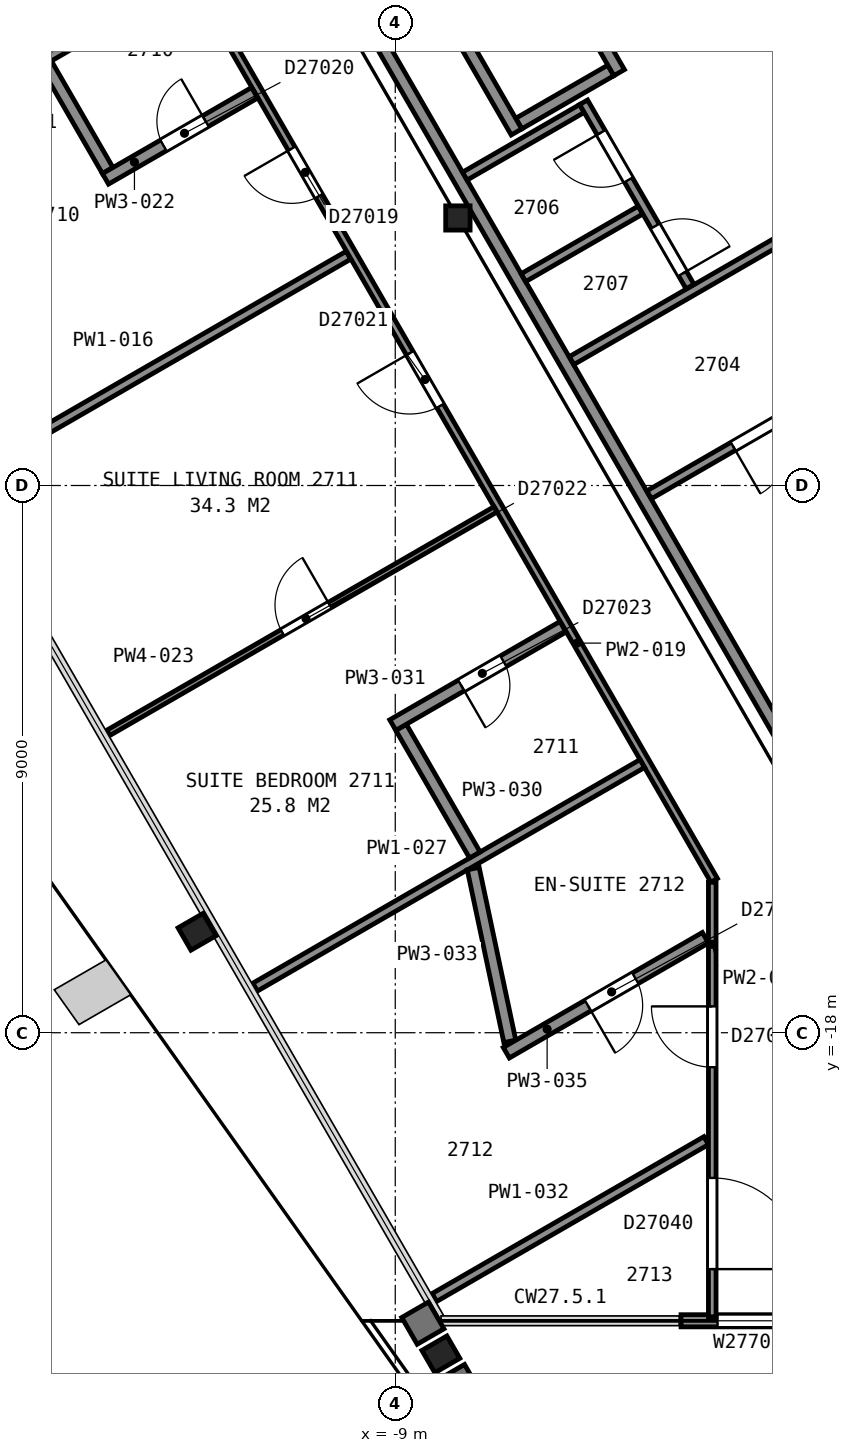
"""IFC4 building model, lengths in metres.
Left out: names, types, materials, properties, quantities, classifications, styles, units other than length and angle.
Written with IfcOpenShell. Run it as: python <this file> out.ifc"""

import sys

from ifc_helpers import new_model, si_unit, direction, frame, frame_2d, origin, origin_2d, place, context, subcontext, project, spatial, rectangle, i_section, extrude, element, fill, save


model = new_model("IFC4")
c1 = context("Model", 3, precision=1e-05, world=origin(), true_north=direction((0.0, 1.0)))
c2 = subcontext(c1, "Body", "Model", "MODEL_VIEW")
j1 = project(units=[si_unit("LENGTHUNIT", "METRE"), si_unit("PLANEANGLEUNIT", "RADIAN")], contexts=[c1])
p1 = place(None, origin())
s1 = spatial("IfcSite", under=j1, at=p1, CompositionType="ELEMENT")
p2 = place(p1, origin())
s2 = spatial("IfcBuilding", under=s1, at=p2, CompositionType="ELEMENT")
p3 = place(p2, frame((0.0, 0.0, 114.4)))
s3 = spatial("IfcBuildingStorey", under=s2, at=p3, CompositionType="ELEMENT", Elevation=114.4)
p4 = place(p3, frame((-12.26, -16.34, 0.0), z_axis=(0.0, 0.0, 1.0), x_axis=(-0.5, 0.866025403784, 0.0)))
e1 = element("IfcColumn", 1, at=p4, inside=s3, PredefinedType="COLUMN", context=c2, shape_type="SweptSolid", body=[
    extrude(i_section(OverallWidth=0.424, OverallDepth=0.475, WebThickness=0.048, FlangeThickness=0.077, FilletRadius=0.015, at=origin_2d()), origin(), (0.0, 0.0, 1.0), 3.56),
])
p5 = place(p3, frame((-8.25, -23.29, 0.0), z_axis=(0.0, 0.0, 1.0), x_axis=(-0.5, 0.866025403784, 0.0)))
e2 = element("IfcColumn", 2, at=p5, inside=s3, PredefinedType="COLUMN", context=c2, shape_type="SweptSolid", body=[
    extrude(i_section(OverallWidth=0.424, OverallDepth=0.475, WebThickness=0.048, FlangeThickness=0.077, FilletRadius=0.015, at=origin_2d()), origin(), (0.0, 0.0, 1.0), 3.555),
])
p6 = place(p3, frame((-7.97, -4.6, 0.0), z_axis=(0.0, 0.0, 1.0), x_axis=(1.0, 0.0, 0.0)))
e3 = element("IfcColumn", 3, at=p6, inside=s3, PredefinedType="COLUMN", context=c2, shape_type="SweptSolid", body=[
    extrude(i_section(OverallWidth=0.401, OverallDepth=0.399, WebThickness=0.025, FlangeThickness=0.04, FilletRadius=0.015, at=origin_2d()), origin(), (0.0, 0.0, 1.0), 3.6),
])
p7 = place(p3, frame((-4.3, -22.738, 0.0), z_axis=(0.0, 0.0, 1.0), x_axis=(1.0, 0.0, 0.0)))
e4 = element("IfcWall", 4, at=p7, inside=s3, PredefinedType="SOLIDWALL", context=c2, shape_type="SweptSolid", body=[
    extrude(rectangle(XDim=8.6, YDim=0.2, at=frame_2d((4.3, 0.0))), origin(), (0.0, 0.0, 1.0), 2.613),
])
p8 = place(p7, frame((0.6, 0.0, 0.9)))
e5 = element("IfcOpeningElement", 5, at=p8, cuts=e4, PredefinedType="OPENING", context=c2, shape_type="SweptSolid", body=[
    extrude(rectangle(XDim=1.0, YDim=1.5, at=frame_2d((0.5, 0.75))), frame((0.0, 0.11, 0.0), z_axis=(0.0, -1.0, 0.0), x_axis=(1.0, 0.0, 0.0)), (0.0, 0.0, 1.0), 0.22),
])
p9 = place(p7, frame((2.2, 0.0, 0.0)))
e6 = element("IfcOpeningElement", 6, at=p9, cuts=e4, PredefinedType="OPENING", context=c2, shape_type="SweptSolid", body=[
    extrude(rectangle(XDim=1.8, YDim=2.4, at=frame_2d((0.9, 1.2))), frame((0.0, 0.11, 0.0), z_axis=(0.0, -1.0, 0.0), x_axis=(1.0, 0.0, 0.0)), (0.0, 0.0, 1.0), 0.22),
])
p10 = place(p7, frame((4.6, 0.0, 0.0)))
e7 = element("IfcOpeningElement", 7, at=p10, cuts=e4, PredefinedType="OPENING", context=c2, shape_type="SweptSolid", body=[
    extrude(rectangle(XDim=1.8, YDim=2.4, at=frame_2d((0.9, 1.2))), frame((0.0, 0.11, 0.0), z_axis=(0.0, -1.0, 0.0), x_axis=(1.0, 0.0, 0.0)), (0.0, 0.0, 1.0), 0.22),
])
p11 = place(p7, frame((7.0, 0.0, 0.9)))
e8 = element("IfcOpeningElement", 8, at=p11, cuts=e4, PredefinedType="OPENING", context=c2, shape_type="SweptSolid", body=[
    extrude(rectangle(XDim=1.0, YDim=1.5, at=frame_2d((0.5, 0.75))), frame((0.0, 0.11, 0.0), z_axis=(0.0, -1.0, 0.0), x_axis=(1.0, 0.0, 0.0)), (0.0, 0.0, 1.0), 0.22),
])
p12 = place(p3, frame((-6.97, -3.048, 0.0), z_axis=(0.0, 0.0, 1.0), x_axis=(0.866036909293, 0.499980071345, 0.0)))
e9 = element("IfcWall", 9, at=p12, inside=s3, PredefinedType="PARTITIONING", context=c2, shape_type="SweptSolid", body=[
    extrude(rectangle(XDim=1.75, YDim=0.2, at=frame_2d((0.875, 0.0))), origin(), (0.0, 0.0, 1.0), 3.6),
])
p13 = place(p3, frame((-5.318, -2.21, 0.0), z_axis=(0.0, 0.0, 1.0), x_axis=(-0.499938297808, 0.866061024631, 0.0)))
e10 = element("IfcWall", 10, at=p13, inside=s3, PredefinedType="PARTITIONING", context=c2, shape_type="SweptSolid", body=[
    extrude(rectangle(XDim=2.35, YDim=0.2, at=frame_2d((1.175, 0.0))), origin(), (0.0, 0.0, 1.0), 3.6),
])
p14 = place(p3, frame((-7.006, -3.185, 0.0), z_axis=(0.0, 0.0, 1.0), x_axis=(-0.499990435942, 0.866030925526, 0.0)))
e11 = element("IfcWall", 11, at=p14, inside=s3, PredefinedType="PARTITIONING", context=c2, shape_type="SweptSolid", body=[
    extrude(rectangle(XDim=2.55, YDim=0.2, at=frame_2d((1.275, 0.0))), origin(), (0.0, 0.0, 1.0), 3.6),
])
p15 = place(p3, frame((-13.664, 5.946, 0.0), z_axis=(0.0, 0.0, 1.0), x_axis=(0.499994327219, -0.866028678941, 0.0)))
e12 = element("IfcWall", 12, at=p15, inside=s3, PredefinedType="PARTITIONING", context=c2, shape_type="SweptSolid", body=[
    extrude(rectangle(XDim=23.968, YDim=0.2, at=frame_2d((11.984, 0.0))), origin(), (0.0, 0.0, 1.0), 3.35),
])
p16 = place(p3, frame((-7.856, -3.912, 0.0), z_axis=(0.0, 0.0, 1.0), x_axis=(0.865971748, 0.500092923031, 0.0)))
e13 = element("IfcWall", 13, at=p16, inside=s3, PredefinedType="PARTITIONING", context=c2, shape_type="SweptSolid", body=[
    extrude(rectangle(XDim=2.225, YDim=0.15, at=frame_2d((1.112, 0.0))), origin(), (0.0, 0.0, 1.0), 3.35),
])
p17 = place(p3, frame((-6.892, -5.582, 0.0), z_axis=(0.0, 0.0, 1.0), x_axis=(0.865944298464, 0.500140452231, 0.0)))
e14 = element("IfcWall", 14, at=p17, inside=s3, PredefinedType="PARTITIONING", context=c2, shape_type="SweptSolid", body=[
    extrude(rectangle(XDim=2.224, YDim=0.15, at=frame_2d((1.112, 0.0))), origin(), (0.0, 0.0, 1.0), 3.35),
])
p18 = place(p3, frame((-6.1, -6.946, 0.0), z_axis=(0.0, 0.0, 1.0), x_axis=(0.866038200431, 0.499977834903, 0.0)))
e15 = element("IfcWall", 15, at=p18, inside=s3, PredefinedType="PARTITIONING", context=c2, shape_type="SweptSolid", body=[
    extrude(rectangle(XDim=4.22, YDim=0.15, at=frame_2d((2.11, 0.0))), origin(), (0.0, 0.0, 1.0), 3.35),
])
p19 = place(p3, frame((-4.152, -5.729, 0.0), z_axis=(0.0, 0.0, 1.0), x_axis=(-0.500024287448, 0.866011380966, 0.0)))
e16 = element("IfcWall", 16, at=p19, inside=s3, PredefinedType="PARTITIONING", context=c2, shape_type="SweptSolid", body=[
    extrude(rectangle(XDim=3.501, YDim=0.15, at=frame_2d((1.75, 0.0))), origin(), (0.0, 0.0, 1.0), 3.35),
])
p20 = place(p19, frame((2.026, 0.0, 0.0)))
e17 = element("IfcOpeningElement", 17, at=p20, cuts=e16, PredefinedType="OPENING", context=c2, shape_type="SweptSolid", body=[
    extrude(rectangle(XDim=0.9, YDim=2.1, at=frame_2d((0.45, 1.05))), frame((0.0, 0.085, 0.0), z_axis=(0.0, -1.0, 0.0), x_axis=(1.0, 0.0, 0.0)), (0.0, 0.0, 1.0), 0.17),
])
p21 = place(p19, frame((0.248, 0.0, 0.0)))
e18 = element("IfcOpeningElement", 18, at=p21, cuts=e16, PredefinedType="OPENING", context=c2, shape_type="SweptSolid", body=[
    extrude(rectangle(XDim=0.9, YDim=2.1, at=frame_2d((0.45, 1.05))), frame((0.0, 0.085, 0.0), z_axis=(0.0, -1.0, 0.0), x_axis=(1.0, 0.0, 0.0)), (0.0, 0.0, 1.0), 0.17),
])
p22 = place(p3, frame((-4.825, -9.154, 0.0), z_axis=(0.0, 0.0, 1.0), x_axis=(0.866023738697, 0.500002884005, 0.0)))
e19 = element("IfcWall", 19, at=p22, inside=s3, PredefinedType="PARTITIONING", context=c2, shape_type="SweptSolid", body=[
    extrude(rectangle(XDim=4.22, YDim=0.15, at=frame_2d((2.11, 0.0))), origin(), (0.0, 0.0, 1.0), 3.35),
])
p23 = place(p22, frame((1.595, 0.0, 0.0)))
e20 = element("IfcOpeningElement", 20, at=p23, cuts=e19, PredefinedType="OPENING", context=c2, shape_type="SweptSolid", body=[
    extrude(rectangle(XDim=0.9, YDim=2.1, at=frame_2d((0.45, 1.05))), frame((0.0, 0.085, 0.0), z_axis=(0.0, -1.0, 0.0), x_axis=(1.0, 0.0, 0.0)), (0.0, 0.0, 1.0), 0.17),
])
p24 = place(p3, frame((-18.775, -4.31, 0.0), z_axis=(0.0, 0.0, 1.0), x_axis=(0.866003534372, 0.50003787702, 0.0)))
e21 = element("IfcWall", 21, at=p24, inside=s3, PredefinedType="PARTITIONING", context=c2, shape_type="SweptSolid", body=[
    extrude(rectangle(XDim=7.348, YDim=0.15, at=frame_2d((3.674, 0.0))), origin(), (0.0, 0.0, 1.0), 2.613),
])
p25 = place(p3, frame((-16.133, -8.887, 0.0), z_axis=(0.0, 0.0, 1.0), x_axis=(0.865997454095, 0.500048407157, 0.0)))
e22 = element("IfcWall", 22, at=p25, inside=s3, PredefinedType="PARTITIONING", context=c2, shape_type="SweptSolid", body=[
    extrude(rectangle(XDim=7.348, YDim=0.15, at=frame_2d((3.674, 0.0))), origin(), (0.0, 0.0, 1.0), 2.613),
])
p26 = place(p3, frame((-3.756, -15.494, 0.0), z_axis=(0.0, 0.0, 1.0), x_axis=(-0.500027787016, 0.866009360349, 0.0)))
e23 = element("IfcWall", 23, at=p26, inside=s3, PredefinedType="PARTITIONING", context=c2, shape_type="SweptSolid", body=[
    extrude(rectangle(XDim=23.856, YDim=0.125, at=frame_2d((11.928, 0.0))), origin(), (0.0, 0.0, 1.0), 2.613),
])
p27 = place(p26, frame((22.393, 0.0, 0.0)))
e24 = element("IfcOpeningElement", 24, at=p27, cuts=e23, PredefinedType="OPENING", context=c2, shape_type="SweptSolid", body=[
    extrude(rectangle(XDim=1.0, YDim=2.1, at=frame_2d((0.5, 1.05))), frame((0.0, 0.073, 0.0), z_axis=(0.0, -1.0, 0.0), x_axis=(1.0, 0.0, 0.0)), (0.0, 0.0, 1.0), 0.145),
])
p28 = place(p26, frame((12.996, 0.0, 0.0)))
e25 = element("IfcOpeningElement", 25, at=p28, cuts=e23, PredefinedType="OPENING", context=c2, shape_type="SweptSolid", body=[
    extrude(rectangle(XDim=0.9, YDim=2.1, at=frame_2d((0.45, 1.05))), frame((0.0, 0.073, 0.0), z_axis=(0.0, -1.0, 0.0), x_axis=(1.0, 0.0, 0.0)), (0.0, 0.0, 1.0), 0.145),
])
p29 = place(p26, frame((9.011, 0.0, 0.0)))
e26 = element("IfcOpeningElement", 26, at=p29, cuts=e23, PredefinedType="OPENING", context=c2, shape_type="SweptSolid", body=[
    extrude(rectangle(XDim=1.0, YDim=2.1, at=frame_2d((0.5, 1.05))), frame((0.0, 0.073, 0.0), z_axis=(0.0, -1.0, 0.0), x_axis=(1.0, 0.0, 0.0)), (0.0, 0.0, 1.0), 0.145),
])
p30 = place(p3, frame((-14.739, -2.071, 0.0), z_axis=(0.0, 0.0, 1.0), x_axis=(0.500078207394, -0.865980246016, 0.0)))
e27 = element("IfcWall", 27, at=p30, inside=s3, PredefinedType="PARTITIONING", context=c2, shape_type="SweptSolid", body=[
    extrude(rectangle(XDim=2.02, YDim=0.2, at=frame_2d((1.01, 0.0))), origin(), (0.0, 0.0, 1.0), 2.613),
])
p31 = place(p3, frame((-13.766, -3.957, 0.0), z_axis=(0.0, 0.0, 1.0), x_axis=(0.866033446572, 0.499986069224, 0.0)))
e28 = element("IfcWall", 28, at=p31, inside=s3, PredefinedType="PARTITIONING", context=c2, shape_type="SweptSolid", body=[
    extrude(rectangle(XDim=2.833, YDim=0.2, at=frame_2d((1.416, 0.0))), origin(), (0.0, 0.0, 1.0), 2.613),
])
p32 = place(p31, frame((1.1, 0.0, 0.0)))
e29 = element("IfcOpeningElement", 29, at=p32, cuts=e28, PredefinedType="OPENING", context=c2, shape_type="SweptSolid", body=[
    extrude(rectangle(XDim=0.8, YDim=2.1, at=frame_2d((0.4, 1.05))), frame((0.0, 0.11, 0.0), z_axis=(0.0, -1.0, 0.0), x_axis=(1.0, 0.0, 0.0)), (0.0, 0.0, 1.0), 0.22),
])
p33 = place(p3, frame((-7.351, -9.392, 0.0), z_axis=(0.0, 0.0, 1.0), x_axis=(-0.8660606245, -0.499938990969, 0.0)))
e30 = element("IfcWall", 30, at=p33, inside=s3, PredefinedType="PARTITIONING", context=c2, shape_type="SweptSolid", body=[
    extrude(rectangle(XDim=7.353, YDim=0.1, at=frame_2d((3.676, 0.0))), origin(), (0.0, 0.0, 1.0), 2.613),
])
p34 = place(p33, frame((3.148, 0.0, 0.0)))
e31 = element("IfcOpeningElement", 31, at=p34, cuts=e30, PredefinedType="OPENING", context=c2, shape_type="SweptSolid", body=[
    extrude(rectangle(XDim=0.9, YDim=2.1, at=frame_2d((0.45, 1.05))), frame((0.0, 0.06, 0.0), z_axis=(0.0, -1.0, 0.0), x_axis=(1.0, 0.0, 0.0)), (0.0, 0.0, 1.0), 0.12),
])
p35 = place(p3, frame((-11.304, -17.25, 0.0), z_axis=(0.0, 0.0, 1.0), x_axis=(0.86600919026, 0.500028081597, 0.0)))
e32 = element("IfcWall", 32, at=p35, inside=s3, PredefinedType="PARTITIONING", context=c2, shape_type="SweptSolid", body=[
    extrude(rectangle(XDim=7.353, YDim=0.15, at=frame_2d((3.676, 0.0))), origin(), (0.0, 0.0, 1.0), 2.613),
])
p36 = place(p3, frame((-8.904, -12.977, 0.0), z_axis=(0.0, 0.0, 1.0), x_axis=(0.499960613912, -0.866048142159, 0.0)))
e33 = element("IfcWall", 33, at=p36, inside=s3, PredefinedType="PARTITIONING", context=c2, shape_type="SweptSolid", body=[
    extrude(rectangle(XDim=2.426, YDim=0.2, at=frame_2d((1.213, 0.0))), origin(), (0.0, 0.0, 1.0), 2.613),
])
p37 = place(p3, frame((-6.241, -11.324, 0.0), z_axis=(0.0, 0.0, 1.0), x_axis=(-0.866003189247, -0.500038474733, 0.0)))
e34 = element("IfcWall", 34, at=p37, inside=s3, PredefinedType="PARTITIONING", context=c2, shape_type="SweptSolid", body=[
    extrude(rectangle(XDim=3.232, YDim=0.2, at=frame_2d((1.616, 0.0))), origin(), (0.0, 0.0, 1.0), 2.613),
])
p38 = place(p37, frame((1.132, 0.0, 0.0)))
e35 = element("IfcOpeningElement", 35, at=p38, cuts=e34, PredefinedType="OPENING", context=c2, shape_type="SweptSolid", body=[
    extrude(rectangle(XDim=0.8, YDim=2.1, at=frame_2d((0.4, 1.05))), frame((0.0, 0.11, 0.0), z_axis=(0.0, -1.0, 0.0), x_axis=(1.0, 0.0, 0.0)), (0.0, 0.0, 1.0), 0.22),
])
p39 = place(p3, frame((-8.357, -22.355, 0.0), z_axis=(0.0, 0.0, 1.0), x_axis=(0.866060346521, 0.499939472521, 0.0)))
e36 = element("IfcWall", 36, at=p39, inside=s3, PredefinedType="PARTITIONING", context=c2, shape_type="SweptSolid", body=[
    extrude(rectangle(XDim=5.161, YDim=0.15, at=frame_2d((2.581, 0.0))), origin(), (0.0, 0.0, 1.0), 2.613),
])
p40 = place(p3, frame((-7.718, -15.301, 0.0), z_axis=(0.0, 0.0, 1.0), x_axis=(0.207306745071, -0.978275990428, 0.0)))
e37 = element("IfcWall", 37, at=p40, inside=s3, PredefinedType="PARTITIONING", context=c2, shape_type="SweptSolid", body=[
    extrude(rectangle(XDim=2.904, YDim=0.2, at=frame_2d((1.452, 0.0))), origin(), (0.0, 0.0, 1.0), 2.613),
])
p41 = place(p3, frame((-7.174, -18.329, 0.0), z_axis=(0.0, 0.0, 1.0), x_axis=(0.865937163705, 0.500152805165, 0.0)))
e38 = element("IfcWall", 38, at=p41, inside=s3, PredefinedType="PARTITIONING", context=c2, shape_type="SweptSolid", body=[
    extrude(rectangle(XDim=3.781, YDim=0.2, at=frame_2d((1.891, 0.0))), origin(), (0.0, 0.0, 1.0), 2.613),
])
p42 = place(p41, frame((1.55, 0.0, 0.0)))
e39 = element("IfcOpeningElement", 39, at=p42, cuts=e38, PredefinedType="OPENING", context=c2, shape_type="SweptSolid", body=[
    extrude(rectangle(XDim=0.9, YDim=2.1, at=frame_2d((0.45, 1.05))), frame((0.0, 0.11, 0.0), z_axis=(0.0, -1.0, 0.0), x_axis=(1.0, 0.0, 0.0)), (0.0, 0.0, 1.0), 0.22),
])
p43 = place(p3, frame((-3.787, -22.673, 0.0), z_axis=(0.0, 0.0, 1.0), x_axis=(0.0, 1.0, 0.0)))
e40 = element("IfcWall", 40, at=p43, inside=s3, PredefinedType="PARTITIONING", context=c2, shape_type="SweptSolid", body=[
    extrude(rectangle(XDim=7.148, YDim=0.125, at=frame_2d((3.574, 0.0))), origin(), (0.0, 0.0, 1.0), 2.613),
])
p44 = place(p43, frame((4.106, 0.0, 0.0)))
e41 = element("IfcOpeningElement", 41, at=p44, cuts=e40, PredefinedType="OPENING", context=c2, shape_type="SweptSolid", body=[
    extrude(rectangle(XDim=1.0, YDim=2.1, at=frame_2d((0.5, 1.05))), frame((0.0, 0.073, 0.0), z_axis=(0.0, -1.0, 0.0), x_axis=(1.0, 0.0, 0.0)), (0.0, 0.0, 1.0), 0.145),
])
p45 = place(p43, frame((0.785, 0.0, 0.0)))
e42 = element("IfcOpeningElement", 42, at=p45, cuts=e40, PredefinedType="OPENING", context=c2, shape_type="SweptSolid", body=[
    extrude(rectangle(XDim=1.5, YDim=2.1, at=frame_2d((0.75, 1.05))), frame((0.0, 0.073, 0.0), z_axis=(0.0, -1.0, 0.0), x_axis=(1.0, 0.0, 0.0)), (0.0, 0.0, 1.0), 0.145),
])
p46 = place(p8, origin())
e43 = element("IfcWindow", 43, at=p46, inside=s3, PartitioningType="SINGLE_PANEL", PredefinedType="WINDOW", context=c2, shape_type="SweptSolid", body=[
    extrude(rectangle(XDim=1.0, YDim=1.5, at=frame_2d((0.5, 0.75))), frame((0.0, 0.03, 0.0), z_axis=(0.0, -1.0, 0.0), x_axis=(1.0, 0.0, 0.0)), (0.0, 0.0, 1.0), 0.06),
])
fill(e5, e43)
p47 = place(p20, origin())
e44 = element("IfcDoor", 44, at=p47, inside=s3, OperationType="SINGLE_SWING_RIGHT", PredefinedType="DOOR", context=c2, shape_type="SweptSolid", body=[
    extrude(rectangle(XDim=0.9, YDim=2.1, at=frame_2d((0.45, 1.05))), frame((0.0, 0.025, 0.0), z_axis=(0.0, -1.0, 0.0), x_axis=(1.0, 0.0, 0.0)), (0.0, 0.0, 1.0), 0.05),
])
fill(e17, e44)
p48 = place(p21, origin())
e45 = element("IfcDoor", 45, at=p48, inside=s3, OperationType="SINGLE_SWING_LEFT", PredefinedType="DOOR", context=c2, shape_type="SweptSolid", body=[
    extrude(rectangle(XDim=0.9, YDim=2.1, at=frame_2d((0.45, 1.05))), frame((0.0, 0.025, 0.0), z_axis=(0.0, -1.0, 0.0), x_axis=(1.0, 0.0, 0.0)), (0.0, 0.0, 1.0), 0.05),
])
fill(e18, e45)
p49 = place(p23, origin())
e46 = element("IfcDoor", 46, at=p49, inside=s3, OperationType="SINGLE_SWING_LEFT", PredefinedType="DOOR", context=c2, shape_type="SweptSolid", body=[
    extrude(rectangle(XDim=0.9, YDim=2.1, at=frame_2d((0.45, 1.05))), frame((0.0, 0.025, 0.0), z_axis=(0.0, -1.0, 0.0), x_axis=(1.0, 0.0, 0.0)), (0.0, 0.0, 1.0), 0.05),
])
fill(e20, e46)
p50 = place(p28, origin())
e47 = element("IfcDoor", 47, at=p50, inside=s3, OperationType="SINGLE_SWING_RIGHT", PredefinedType="DOOR", context=c2, shape_type="SweptSolid", body=[
    extrude(rectangle(XDim=0.9, YDim=2.1, at=frame_2d((0.45, 1.05))), frame((0.0, 0.025, 0.0), z_axis=(0.0, -1.0, 0.0), x_axis=(1.0, 0.0, 0.0)), (0.0, 0.0, 1.0), 0.05),
])
fill(e25, e47)
p51 = place(p29, origin())
e48 = element("IfcDoor", 48, at=p51, inside=s3, OperationType="SINGLE_SWING_RIGHT", PredefinedType="DOOR", context=c2, shape_type="SweptSolid", body=[
    extrude(rectangle(XDim=1.0, YDim=2.1, at=frame_2d((0.5, 1.05))), frame((0.0, 0.025, 0.0), z_axis=(0.0, -1.0, 0.0), x_axis=(1.0, 0.0, 0.0)), (0.0, 0.0, 1.0), 0.05),
])
fill(e26, e48)
p52 = place(p32, origin())
e49 = element("IfcDoor", 49, at=p52, inside=s3, OperationType="SINGLE_SWING_RIGHT", PredefinedType="DOOR", context=c2, shape_type="SweptSolid", body=[
    extrude(rectangle(XDim=0.8, YDim=2.1, at=frame_2d((0.4, 1.05))), frame((0.0, 0.025, 0.0), z_axis=(0.0, -1.0, 0.0), x_axis=(1.0, 0.0, 0.0)), (0.0, 0.0, 1.0), 0.05),
])
fill(e29, e49)
p53 = place(p34, origin())
e50 = element("IfcDoor", 50, at=p53, inside=s3, OperationType="SINGLE_SWING_LEFT", PredefinedType="DOOR", context=c2, shape_type="SweptSolid", body=[
    extrude(rectangle(XDim=0.9, YDim=2.1, at=frame_2d((0.45, 1.05))), frame((0.0, 0.025, 0.0), z_axis=(0.0, -1.0, 0.0), x_axis=(1.0, 0.0, 0.0)), (0.0, 0.0, 1.0), 0.05),
])
fill(e31, e50)
p54 = place(p38, origin())
e51 = element("IfcDoor", 51, at=p54, inside=s3, OperationType="SINGLE_SWING_RIGHT", PredefinedType="DOOR", context=c2, shape_type="SweptSolid", body=[
    extrude(rectangle(XDim=0.8, YDim=2.1, at=frame_2d((0.4, 1.05))), frame((0.0, 0.025, 0.0), z_axis=(0.0, -1.0, 0.0), x_axis=(1.0, 0.0, 0.0)), (0.0, 0.0, 1.0), 0.05),
])
fill(e35, e51)
p55 = place(p42, origin())
e52 = element("IfcDoor", 52, at=p55, inside=s3, OperationType="SINGLE_SWING_LEFT", PredefinedType="DOOR", context=c2, shape_type="SweptSolid", body=[
    extrude(rectangle(XDim=0.9, YDim=2.1, at=frame_2d((0.45, 1.05))), frame((0.0, 0.025, 0.0), z_axis=(0.0, -1.0, 0.0), x_axis=(1.0, 0.0, 0.0)), (0.0, 0.0, 1.0), 0.05),
])
fill(e39, e52)
p56 = place(p44, origin())
e53 = element("IfcDoor", 53, at=p56, inside=s3, OperationType="SINGLE_SWING_RIGHT", PredefinedType="DOOR", context=c2, shape_type="SweptSolid", body=[
    extrude(rectangle(XDim=1.0, YDim=2.1, at=frame_2d((0.5, 1.05))), frame((0.0, 0.025, 0.0), z_axis=(0.0, -1.0, 0.0), x_axis=(1.0, 0.0, 0.0)), (0.0, 0.0, 1.0), 0.05),
])
fill(e41, e53)
p57 = place(p45, origin())
e54 = element("IfcDoor", 54, at=p57, inside=s3, OperationType="DOUBLE_DOOR_SINGLE_SWING", PredefinedType="DOOR", context=c2, shape_type="SweptSolid", body=[
    extrude(rectangle(XDim=1.5, YDim=2.1, at=frame_2d((0.75, 1.05))), frame((0.0, 0.025, 0.0), z_axis=(0.0, -1.0, 0.0), x_axis=(1.0, 0.0, 0.0)), (0.0, 0.0, 1.0), 0.05),
])
fill(e42, e54)
save(model, sys.argv[1])
